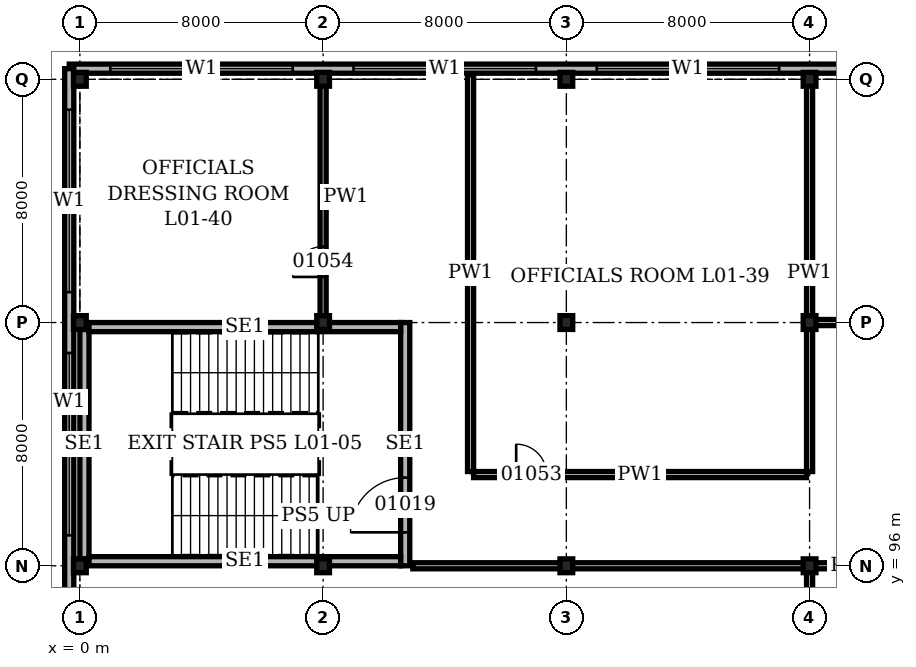
"""IFC4 building model, lengths in metres.
Left out: names, types, materials, properties, quantities, classifications, styles, units other than length and angle.
Written with IfcOpenShell. Run it as: python <this file> out.ifc"""

import sys

from ifc_helpers import new_model, si_unit, direction, frame, frame_2d, origin, origin_2d, place, context, subcontext, project, spatial, rectangle, i_section, extrude, element, fill, save


model = new_model("IFC4")
c1 = context("Model", 3, precision=1e-05, world=origin(), true_north=direction((0.0, 1.0)))
c2 = subcontext(c1, "Body", "Model", "MODEL_VIEW")
j1 = project(units=[si_unit("LENGTHUNIT", "METRE"), si_unit("PLANEANGLEUNIT", "RADIAN")], contexts=[c1])
p1 = place(None, origin())
s1 = spatial("IfcSite", under=j1, at=p1, CompositionType="ELEMENT")
p2 = place(p1, origin())
s2 = spatial("IfcBuilding", under=s1, at=p2, CompositionType="ELEMENT")
p3 = place(p2, frame((0.0, 0.0, 4.9)))
s3 = spatial("IfcBuildingStorey", under=s2, at=p3, CompositionType="ELEMENT", Elevation=4.9)
for number, where, z_axis, x_axis in (
    (1, (0.0, 96.0, 0.0), (0.0, 0.0, 1.0), (1.0, 0.0, 0.0)),
    (2, (0.0, 104.0, 0.0), (0.0, 0.0, 1.0), (1.0, 0.0, 0.0)),
    (3, (0.0, 112.0, 0.0), (0.0, 0.0, 1.0), (1.0, 0.0, 0.0)),
    (4, (8.0, 96.0, 0.0), (0.0, 0.0, 1.0), (1.0, 0.0, 0.0)),
    (5, (8.0, 104.0, 0.0), (0.0, 0.0, 1.0), (1.0, 0.0, 0.0)),
    (6, (8.0, 112.0, 0.0), (0.0, 0.0, 1.0), (1.0, 0.0, 0.0)),
    (7, (16.0, 96.0, 0.0), (0.0, 0.0, 1.0), (1.0, 0.0, 0.0)),
    (8, (16.0, 104.0, 0.0), (0.0, 0.0, 1.0), (1.0, 0.0, 0.0)),
    (9, (16.0, 112.0, 0.0), (0.0, 0.0, 1.0), (1.0, 0.0, 0.0)),
    (10, (24.0, 96.0, 0.0), (0.0, 0.0, 1.0), (1.0, 0.0, 0.0)),
    (11, (24.0, 104.0, 0.0), (0.0, 0.0, 1.0), (1.0, 0.0, 0.0)),
    (12, (24.0, 112.0, 0.0), (0.0, 0.0, 1.0), (1.0, 0.0, 0.0)),
):
    element("IfcColumn", number, at=place(p3, frame(where, z_axis=z_axis, x_axis=x_axis)), inside=s3, PredefinedType="COLUMN", context=c2, shape_type="SweptSolid", body=[
        extrude(i_section(OverallWidth=0.419, OverallDepth=0.455, WebThickness=0.042, FlangeThickness=0.068, at=origin_2d()), origin(), (0.0, 0.0, 1.0), 5.0),
    ])
p4 = place(p3, frame((112.35, 112.35, 0.0), z_axis=(0.0, 0.0, 1.0), x_axis=(-1.0, 0.0, 0.0)))
e13 = element("IfcWall", 13, at=p4, inside=s3, PredefinedType="SOLIDWALL", context=c2, shape_type="SweptSolid", body=[
    extrude(rectangle(XDim=112.7, YDim=0.3, at=frame_2d((56.35, 0.0))), origin(), (0.0, 0.0, 1.0), 5.0),
])
p5 = place(p4, frame((1.35, 0.0, 1.0)))
e14 = element("IfcOpeningElement", 14, at=p5, cuts=e13, PredefinedType="OPENING", context=c2, shape_type="SweptSolid", body=[
    extrude(rectangle(XDim=6.0, YDim=1.5, at=frame_2d((3.0, 0.75))), frame((0.0, 0.16, 0.0), z_axis=(0.0, -1.0, 0.0), x_axis=(1.0, 0.0, 0.0)), (0.0, 0.0, 1.0), 0.32),
])
p6 = place(p4, frame((9.35, 0.0, 1.0)))
e15 = element("IfcOpeningElement", 15, at=p6, cuts=e13, PredefinedType="OPENING", context=c2, shape_type="SweptSolid", body=[
    extrude(rectangle(XDim=6.0, YDim=1.5, at=frame_2d((3.0, 0.75))), frame((0.0, 0.16, 0.0), z_axis=(0.0, -1.0, 0.0), x_axis=(1.0, 0.0, 0.0)), (0.0, 0.0, 1.0), 0.32),
])
p7 = place(p4, frame((17.35, 0.0, 1.0)))
e16 = element("IfcOpeningElement", 16, at=p7, cuts=e13, PredefinedType="OPENING", context=c2, shape_type="SweptSolid", body=[
    extrude(rectangle(XDim=6.0, YDim=1.5, at=frame_2d((3.0, 0.75))), frame((0.0, 0.16, 0.0), z_axis=(0.0, -1.0, 0.0), x_axis=(1.0, 0.0, 0.0)), (0.0, 0.0, 1.0), 0.32),
])
p8 = place(p4, frame((25.35, 0.0, 1.0)))
e17 = element("IfcOpeningElement", 17, at=p8, cuts=e13, PredefinedType="OPENING", context=c2, shape_type="SweptSolid", body=[
    extrude(rectangle(XDim=6.0, YDim=1.5, at=frame_2d((3.0, 0.75))), frame((0.0, 0.16, 0.0), z_axis=(0.0, -1.0, 0.0), x_axis=(1.0, 0.0, 0.0)), (0.0, 0.0, 1.0), 0.32),
])
p9 = place(p4, frame((33.35, 0.0, 1.0)))
e18 = element("IfcOpeningElement", 18, at=p9, cuts=e13, PredefinedType="OPENING", context=c2, shape_type="SweptSolid", body=[
    extrude(rectangle(XDim=6.0, YDim=1.5, at=frame_2d((3.0, 0.75))), frame((0.0, 0.16, 0.0), z_axis=(0.0, -1.0, 0.0), x_axis=(1.0, 0.0, 0.0)), (0.0, 0.0, 1.0), 0.32),
])
p10 = place(p4, frame((41.35, 0.0, 1.0)))
e19 = element("IfcOpeningElement", 19, at=p10, cuts=e13, PredefinedType="OPENING", context=c2, shape_type="SweptSolid", body=[
    extrude(rectangle(XDim=6.0, YDim=1.5, at=frame_2d((3.0, 0.75))), frame((0.0, 0.16, 0.0), z_axis=(0.0, -1.0, 0.0), x_axis=(1.0, 0.0, 0.0)), (0.0, 0.0, 1.0), 0.32),
])
p11 = place(p4, frame((49.35, 0.0, 1.0)))
e20 = element("IfcOpeningElement", 20, at=p11, cuts=e13, PredefinedType="OPENING", context=c2, shape_type="SweptSolid", body=[
    extrude(rectangle(XDim=6.0, YDim=1.5, at=frame_2d((3.0, 0.75))), frame((0.0, 0.16, 0.0), z_axis=(0.0, -1.0, 0.0), x_axis=(1.0, 0.0, 0.0)), (0.0, 0.0, 1.0), 0.32),
])
p12 = place(p4, frame((57.35, 0.0, 1.0)))
e21 = element("IfcOpeningElement", 21, at=p12, cuts=e13, PredefinedType="OPENING", context=c2, shape_type="SweptSolid", body=[
    extrude(rectangle(XDim=6.0, YDim=1.5, at=frame_2d((3.0, 0.75))), frame((0.0, 0.16, 0.0), z_axis=(0.0, -1.0, 0.0), x_axis=(1.0, 0.0, 0.0)), (0.0, 0.0, 1.0), 0.32),
])
p13 = place(p4, frame((65.35, 0.0, 1.0)))
e22 = element("IfcOpeningElement", 22, at=p13, cuts=e13, PredefinedType="OPENING", context=c2, shape_type="SweptSolid", body=[
    extrude(rectangle(XDim=6.0, YDim=1.5, at=frame_2d((3.0, 0.75))), frame((0.0, 0.16, 0.0), z_axis=(0.0, -1.0, 0.0), x_axis=(1.0, 0.0, 0.0)), (0.0, 0.0, 1.0), 0.32),
])
p14 = place(p4, frame((73.35, 0.0, 1.0)))
e23 = element("IfcOpeningElement", 23, at=p14, cuts=e13, PredefinedType="OPENING", context=c2, shape_type="SweptSolid", body=[
    extrude(rectangle(XDim=6.0, YDim=1.5, at=frame_2d((3.0, 0.75))), frame((0.0, 0.16, 0.0), z_axis=(0.0, -1.0, 0.0), x_axis=(1.0, 0.0, 0.0)), (0.0, 0.0, 1.0), 0.32),
])
p15 = place(p4, frame((81.35, 0.0, 1.0)))
e24 = element("IfcOpeningElement", 24, at=p15, cuts=e13, PredefinedType="OPENING", context=c2, shape_type="SweptSolid", body=[
    extrude(rectangle(XDim=6.0, YDim=1.5, at=frame_2d((3.0, 0.75))), frame((0.0, 0.16, 0.0), z_axis=(0.0, -1.0, 0.0), x_axis=(1.0, 0.0, 0.0)), (0.0, 0.0, 1.0), 0.32),
])
p16 = place(p4, frame((89.35, 0.0, 1.0)))
e25 = element("IfcOpeningElement", 25, at=p16, cuts=e13, PredefinedType="OPENING", context=c2, shape_type="SweptSolid", body=[
    extrude(rectangle(XDim=6.0, YDim=1.5, at=frame_2d((3.0, 0.75))), frame((0.0, 0.16, 0.0), z_axis=(0.0, -1.0, 0.0), x_axis=(1.0, 0.0, 0.0)), (0.0, 0.0, 1.0), 0.32),
])
p17 = place(p4, frame((97.35, 0.0, 1.0)))
e26 = element("IfcOpeningElement", 26, at=p17, cuts=e13, PredefinedType="OPENING", context=c2, shape_type="SweptSolid", body=[
    extrude(rectangle(XDim=6.0, YDim=1.5, at=frame_2d((3.0, 0.75))), frame((0.0, 0.16, 0.0), z_axis=(0.0, -1.0, 0.0), x_axis=(1.0, 0.0, 0.0)), (0.0, 0.0, 1.0), 0.32),
])
p18 = place(p4, frame((105.35, 0.0, 1.0)))
e27 = element("IfcOpeningElement", 27, at=p18, cuts=e13, PredefinedType="OPENING", context=c2, shape_type="SweptSolid", body=[
    extrude(rectangle(XDim=6.0, YDim=1.5, at=frame_2d((3.0, 0.75))), frame((0.0, 0.16, 0.0), z_axis=(0.0, -1.0, 0.0), x_axis=(1.0, 0.0, 0.0)), (0.0, 0.0, 1.0), 0.32),
])
p19 = place(p3, frame((-0.35, 112.35, 0.0), z_axis=(0.0, 0.0, 1.0), x_axis=(0.0, -1.0, 0.0)))
e28 = element("IfcWall", 28, at=p19, inside=s3, PredefinedType="SOLIDWALL", context=c2, shape_type="SweptSolid", body=[
    extrude(rectangle(XDim=112.7, YDim=0.3, at=frame_2d((56.35, 0.0))), origin(), (0.0, 0.0, 1.0), 5.0),
])
p20 = place(p19, frame((1.35, 0.0, 1.0)))
e29 = element("IfcOpeningElement", 29, at=p20, cuts=e28, PredefinedType="OPENING", context=c2, shape_type="SweptSolid", body=[
    extrude(rectangle(XDim=6.0, YDim=1.5, at=frame_2d((3.0, 0.75))), frame((0.0, 0.16, 0.0), z_axis=(0.0, -1.0, 0.0), x_axis=(1.0, 0.0, 0.0)), (0.0, 0.0, 1.0), 0.32),
])
p21 = place(p19, frame((9.35, 0.0, 1.0)))
e30 = element("IfcOpeningElement", 30, at=p21, cuts=e28, PredefinedType="OPENING", context=c2, shape_type="SweptSolid", body=[
    extrude(rectangle(XDim=6.0, YDim=1.5, at=frame_2d((3.0, 0.75))), frame((0.0, 0.16, 0.0), z_axis=(0.0, -1.0, 0.0), x_axis=(1.0, 0.0, 0.0)), (0.0, 0.0, 1.0), 0.32),
])
p22 = place(p19, frame((17.35, 0.0, 1.0)))
e31 = element("IfcOpeningElement", 31, at=p22, cuts=e28, PredefinedType="OPENING", context=c2, shape_type="SweptSolid", body=[
    extrude(rectangle(XDim=6.0, YDim=1.5, at=frame_2d((3.0, 0.75))), frame((0.0, 0.16, 0.0), z_axis=(0.0, -1.0, 0.0), x_axis=(1.0, 0.0, 0.0)), (0.0, 0.0, 1.0), 0.32),
])
p23 = place(p19, frame((25.35, 0.0, 1.0)))
e32 = element("IfcOpeningElement", 32, at=p23, cuts=e28, PredefinedType="OPENING", context=c2, shape_type="SweptSolid", body=[
    extrude(rectangle(XDim=6.0, YDim=1.5, at=frame_2d((3.0, 0.75))), frame((0.0, 0.16, 0.0), z_axis=(0.0, -1.0, 0.0), x_axis=(1.0, 0.0, 0.0)), (0.0, 0.0, 1.0), 0.32),
])
p24 = place(p19, frame((33.35, 0.0, 1.0)))
e33 = element("IfcOpeningElement", 33, at=p24, cuts=e28, PredefinedType="OPENING", context=c2, shape_type="SweptSolid", body=[
    extrude(rectangle(XDim=6.0, YDim=1.5, at=frame_2d((3.0, 0.75))), frame((0.0, 0.16, 0.0), z_axis=(0.0, -1.0, 0.0), x_axis=(1.0, 0.0, 0.0)), (0.0, 0.0, 1.0), 0.32),
])
p25 = place(p19, frame((41.35, 0.0, 1.0)))
e34 = element("IfcOpeningElement", 34, at=p25, cuts=e28, PredefinedType="OPENING", context=c2, shape_type="SweptSolid", body=[
    extrude(rectangle(XDim=6.0, YDim=1.5, at=frame_2d((3.0, 0.75))), frame((0.0, 0.16, 0.0), z_axis=(0.0, -1.0, 0.0), x_axis=(1.0, 0.0, 0.0)), (0.0, 0.0, 1.0), 0.32),
])
p26 = place(p19, frame((49.35, 0.0, 1.0)))
e35 = element("IfcOpeningElement", 35, at=p26, cuts=e28, PredefinedType="OPENING", context=c2, shape_type="SweptSolid", body=[
    extrude(rectangle(XDim=6.0, YDim=1.5, at=frame_2d((3.0, 0.75))), frame((0.0, 0.16, 0.0), z_axis=(0.0, -1.0, 0.0), x_axis=(1.0, 0.0, 0.0)), (0.0, 0.0, 1.0), 0.32),
])
p27 = place(p19, frame((57.35, 0.0, 1.0)))
e36 = element("IfcOpeningElement", 36, at=p27, cuts=e28, PredefinedType="OPENING", context=c2, shape_type="SweptSolid", body=[
    extrude(rectangle(XDim=6.0, YDim=1.5, at=frame_2d((3.0, 0.75))), frame((0.0, 0.16, 0.0), z_axis=(0.0, -1.0, 0.0), x_axis=(1.0, 0.0, 0.0)), (0.0, 0.0, 1.0), 0.32),
])
p28 = place(p19, frame((65.35, 0.0, 1.0)))
e37 = element("IfcOpeningElement", 37, at=p28, cuts=e28, PredefinedType="OPENING", context=c2, shape_type="SweptSolid", body=[
    extrude(rectangle(XDim=6.0, YDim=1.5, at=frame_2d((3.0, 0.75))), frame((0.0, 0.16, 0.0), z_axis=(0.0, -1.0, 0.0), x_axis=(1.0, 0.0, 0.0)), (0.0, 0.0, 1.0), 0.32),
])
p29 = place(p19, frame((73.35, 0.0, 1.0)))
e38 = element("IfcOpeningElement", 38, at=p29, cuts=e28, PredefinedType="OPENING", context=c2, shape_type="SweptSolid", body=[
    extrude(rectangle(XDim=6.0, YDim=1.5, at=frame_2d((3.0, 0.75))), frame((0.0, 0.16, 0.0), z_axis=(0.0, -1.0, 0.0), x_axis=(1.0, 0.0, 0.0)), (0.0, 0.0, 1.0), 0.32),
])
p30 = place(p19, frame((81.35, 0.0, 1.0)))
e39 = element("IfcOpeningElement", 39, at=p30, cuts=e28, PredefinedType="OPENING", context=c2, shape_type="SweptSolid", body=[
    extrude(rectangle(XDim=6.0, YDim=1.5, at=frame_2d((3.0, 0.75))), frame((0.0, 0.16, 0.0), z_axis=(0.0, -1.0, 0.0), x_axis=(1.0, 0.0, 0.0)), (0.0, 0.0, 1.0), 0.32),
])
p31 = place(p19, frame((89.35, 0.0, 1.0)))
e40 = element("IfcOpeningElement", 40, at=p31, cuts=e28, PredefinedType="OPENING", context=c2, shape_type="SweptSolid", body=[
    extrude(rectangle(XDim=6.0, YDim=1.5, at=frame_2d((3.0, 0.75))), frame((0.0, 0.16, 0.0), z_axis=(0.0, -1.0, 0.0), x_axis=(1.0, 0.0, 0.0)), (0.0, 0.0, 1.0), 0.32),
])
p32 = place(p19, frame((97.35, 0.0, 1.0)))
e41 = element("IfcOpeningElement", 41, at=p32, cuts=e28, PredefinedType="OPENING", context=c2, shape_type="SweptSolid", body=[
    extrude(rectangle(XDim=6.0, YDim=1.5, at=frame_2d((3.0, 0.75))), frame((0.0, 0.16, 0.0), z_axis=(0.0, -1.0, 0.0), x_axis=(1.0, 0.0, 0.0)), (0.0, 0.0, 1.0), 0.32),
])
p33 = place(p19, frame((105.35, 0.0, 1.0)))
e42 = element("IfcOpeningElement", 42, at=p33, cuts=e28, PredefinedType="OPENING", context=c2, shape_type="SweptSolid", body=[
    extrude(rectangle(XDim=6.0, YDim=1.5, at=frame_2d((3.0, 0.75))), frame((0.0, 0.16, 0.0), z_axis=(0.0, -1.0, 0.0), x_axis=(1.0, 0.0, 0.0)), (0.0, 0.0, 1.0), 0.32),
])
p34 = place(p3, frame((0.15, 96.227, 0.0), z_axis=(0.0, 0.0, 1.0), x_axis=(0.0, 1.0, 0.0)))
e43 = element("IfcWall", 43, at=p34, inside=s3, PredefinedType="SOLIDWALL", context=c2, shape_type="SweptSolid", body=[
    extrude(rectangle(XDim=7.545, YDim=0.3, at=frame_2d((3.773, 0.0))), origin(), (0.0, 0.0, 1.0), 4.8),
])
p35 = place(p3, frame((10.7, 96.0, 0.0), z_axis=(0.0, 0.0, 1.0), x_axis=(0.0, 1.0, 0.0)))
e44 = element("IfcWall", 44, at=p35, inside=s3, PredefinedType="SOLIDWALL", context=c2, shape_type="SweptSolid", body=[
    extrude(rectangle(XDim=8.0, YDim=0.3, at=frame_2d((4.0, 0.0))), origin(), (0.0, 0.0, 1.0), 4.8),
])
p36 = place(p35, frame((1.1, 0.0, 0.0)))
e45 = element("IfcOpeningElement", 45, at=p36, cuts=e44, PredefinedType="OPENING", context=c2, shape_type="SweptSolid", body=[
    extrude(rectangle(XDim=1.8, YDim=2.1, at=frame_2d((0.9, 1.05))), frame((0.0, 0.16, 0.0), z_axis=(0.0, -1.0, 0.0), x_axis=(1.0, 0.0, 0.0)), (0.0, 0.0, 1.0), 0.32),
])
for number, where, z_axis, x_axis in (
    (46, (0.3, 96.15, 0.0), (0.0, 0.0, 1.0), (1.0, 0.0, 0.0)),
    (47, (0.3, 103.85, 0.0), (0.0, 0.0, 1.0), (1.0, 0.0, 0.0)),
):
    element("IfcWall", number, at=place(p3, frame(where, z_axis=z_axis, x_axis=x_axis)), inside=s3, PredefinedType="SOLIDWALL", context=c2, shape_type="SweptSolid", body=[
        extrude(rectangle(XDim=10.25, YDim=0.3, at=frame_2d((5.125, 0.0))), origin(), (0.0, 0.0, 1.0), 4.8),
    ])
p37 = place(p3, frame((10.95, 96.0, 0.0), z_axis=(0.0, 0.0, 1.0), x_axis=(1.0, 0.0, 0.0)))
e48 = element("IfcWall", 48, at=p37, inside=s3, PredefinedType="PARTITIONING", context=c2, shape_type="SweptSolid", body=[
    extrude(rectangle(XDim=28.95, YDim=0.2, at=frame_2d((14.475, 0.0))), origin(), (0.0, 0.0, 1.0), 4.028),
])
p38 = place(p3, frame((12.95, 99.0, 0.0), z_axis=(0.0, 0.0, 1.0), x_axis=(1.0, 0.0, 0.0)))
e49 = element("IfcWall", 49, at=p38, inside=s3, PredefinedType="PARTITIONING", context=c2, shape_type="SweptSolid", body=[
    extrude(rectangle(XDim=10.95, YDim=0.2, at=frame_2d((5.475, 0.0))), origin(), (0.0, 0.0, 1.0), 4.8),
])
p39 = place(p38, frame((1.4, 0.0, 0.0)))
e50 = element("IfcOpeningElement", 50, at=p39, cuts=e49, PredefinedType="OPENING", context=c2, shape_type="SweptSolid", body=[
    extrude(rectangle(XDim=1.0, YDim=2.1, at=frame_2d((0.5, 1.05))), frame((0.0, 0.11, 0.0), z_axis=(0.0, -1.0, 0.0), x_axis=(1.0, 0.0, 0.0)), (0.0, 0.0, 1.0), 0.22),
])
p40 = place(p3, frame((24.1, 104.0, 0.0), z_axis=(0.0, 0.0, 1.0), x_axis=(1.0, 0.0, 0.0)))
e51 = element("IfcWall", 51, at=p40, inside=s3, PredefinedType="PARTITIONING", context=c2, shape_type="SweptSolid", body=[
    extrude(rectangle(XDim=79.8, YDim=0.2, at=frame_2d((39.9, 0.0))), origin(), (0.0, 0.0, 1.0), 4.028),
])
p41 = place(p40, frame((1.0, 0.0, 0.0)))
e52 = element("IfcOpeningElement", 52, at=p41, cuts=e51, PredefinedType="OPENING", context=c2, shape_type="SweptSolid", body=[
    extrude(rectangle(XDim=1.8, YDim=2.4, at=frame_2d((0.9, 1.2))), frame((0.0, 0.11, 0.0), z_axis=(0.0, -1.0, 0.0), x_axis=(1.0, 0.0, 0.0)), (0.0, 0.0, 1.0), 0.22),
])
p42 = place(p40, frame((20.65, 0.0, 0.0)))
e53 = element("IfcOpeningElement", 53, at=p42, cuts=e51, PredefinedType="OPENING", context=c2, shape_type="SweptSolid", body=[
    extrude(rectangle(XDim=1.0, YDim=2.1, at=frame_2d((0.5, 1.05))), frame((0.0, 0.11, 0.0), z_axis=(0.0, -1.0, 0.0), x_axis=(1.0, 0.0, 0.0)), (0.0, 0.0, 1.0), 0.22),
])
p43 = place(p40, frame((34.15, 0.0, 0.0)))
e54 = element("IfcOpeningElement", 54, at=p43, cuts=e51, PredefinedType="OPENING", context=c2, shape_type="SweptSolid", body=[
    extrude(rectangle(XDim=1.0, YDim=2.1, at=frame_2d((0.5, 1.05))), frame((0.0, 0.11, 0.0), z_axis=(0.0, -1.0, 0.0), x_axis=(1.0, 0.0, 0.0)), (0.0, 0.0, 1.0), 0.22),
])
p44 = place(p40, frame((44.65, 0.0, 0.0)))
e55 = element("IfcOpeningElement", 55, at=p44, cuts=e51, PredefinedType="OPENING", context=c2, shape_type="SweptSolid", body=[
    extrude(rectangle(XDim=1.0, YDim=2.1, at=frame_2d((0.5, 1.05))), frame((0.0, 0.11, 0.0), z_axis=(0.0, -1.0, 0.0), x_axis=(1.0, 0.0, 0.0)), (0.0, 0.0, 1.0), 0.22),
])
p45 = place(p40, frame((65.4, 0.0, 0.0)))
e56 = element("IfcOpeningElement", 56, at=p45, cuts=e51, PredefinedType="OPENING", context=c2, shape_type="SweptSolid", body=[
    extrude(rectangle(XDim=1.0, YDim=2.1, at=frame_2d((0.5, 1.05))), frame((0.0, 0.11, 0.0), z_axis=(0.0, -1.0, 0.0), x_axis=(1.0, 0.0, 0.0)), (0.0, 0.0, 1.0), 0.22),
])
p46 = place(p3, frame((8.0, 104.1, 0.0), z_axis=(0.0, 0.0, 1.0), x_axis=(0.0, 1.0, 0.0)))
e57 = element("IfcWall", 57, at=p46, inside=s3, PredefinedType="PARTITIONING", context=c2, shape_type="SweptSolid", body=[
    extrude(rectangle(XDim=8.05, YDim=0.2, at=frame_2d((4.025, 0.0))), origin(), (0.0, 0.0, 1.0), 4.028),
])
p47 = place(p46, frame((1.4, 0.0, 0.0)))
e58 = element("IfcOpeningElement", 58, at=p47, cuts=e57, PredefinedType="OPENING", context=c2, shape_type="SweptSolid", body=[
    extrude(rectangle(XDim=1.0, YDim=2.1, at=frame_2d((0.5, 1.05))), frame((0.0, 0.11, 0.0), z_axis=(0.0, -1.0, 0.0), x_axis=(1.0, 0.0, 0.0)), (0.0, 0.0, 1.0), 0.22),
])
p48 = place(p3, frame((12.85, 99.1, 0.0), z_axis=(0.0, 0.0, 1.0), x_axis=(0.0, 1.0, 0.0)))
e59 = element("IfcWall", 59, at=p48, inside=s3, PredefinedType="PARTITIONING", context=c2, shape_type="SweptSolid", body=[
    extrude(rectangle(XDim=13.05, YDim=0.2, at=frame_2d((6.525, 0.0))), origin(), (0.0, 0.0, 1.0), 4.8),
])
p49 = place(p3, frame((24.0, 72.1, 0.0), z_axis=(0.0, 0.0, 1.0), x_axis=(0.0, 1.0, 0.0)))
e60 = element("IfcWall", 60, at=p49, inside=s3, PredefinedType="PARTITIONING", context=c2, shape_type="SweptSolid", body=[
    extrude(rectangle(XDim=23.8, YDim=0.2, at=frame_2d((11.9, 0.0))), origin(), (0.0, 0.0, 1.0), 4.028),
])
p50 = place(p3, frame((24.0, 99.1, 0.0), z_axis=(0.0, 0.0, 1.0), x_axis=(0.0, 1.0, 0.0)))
e61 = element("IfcWall", 61, at=p50, inside=s3, PredefinedType="PARTITIONING", context=c2, shape_type="SweptSolid", body=[
    extrude(rectangle(XDim=13.05, YDim=0.2, at=frame_2d((6.525, 0.0))), origin(), (0.0, 0.0, 1.0), 4.028),
])
p51 = place(p16, origin())
e62 = element("IfcWindow", 62, at=p51, inside=s3, PartitioningType="SINGLE_PANEL", PredefinedType="WINDOW", context=c2, shape_type="SweptSolid", body=[
    extrude(rectangle(XDim=6.0, YDim=1.5, at=frame_2d((3.0, 0.75))), frame((0.0, 0.03, 0.0), z_axis=(0.0, -1.0, 0.0), x_axis=(1.0, 0.0, 0.0)), (0.0, 0.0, 1.0), 0.06),
])
fill(e25, e62)
p52 = place(p17, origin())
e63 = element("IfcWindow", 63, at=p52, inside=s3, PartitioningType="SINGLE_PANEL", PredefinedType="WINDOW", context=c2, shape_type="SweptSolid", body=[
    extrude(rectangle(XDim=6.0, YDim=1.5, at=frame_2d((3.0, 0.75))), frame((0.0, 0.03, 0.0), z_axis=(0.0, -1.0, 0.0), x_axis=(1.0, 0.0, 0.0)), (0.0, 0.0, 1.0), 0.06),
])
fill(e26, e63)
p53 = place(p18, origin())
e64 = element("IfcWindow", 64, at=p53, inside=s3, PartitioningType="SINGLE_PANEL", PredefinedType="WINDOW", context=c2, shape_type="SweptSolid", body=[
    extrude(rectangle(XDim=6.0, YDim=1.5, at=frame_2d((3.0, 0.75))), frame((0.0, 0.03, 0.0), z_axis=(0.0, -1.0, 0.0), x_axis=(1.0, 0.0, 0.0)), (0.0, 0.0, 1.0), 0.06),
])
fill(e27, e64)
p54 = place(p20, origin())
e65 = element("IfcWindow", 65, at=p54, inside=s3, PartitioningType="SINGLE_PANEL", PredefinedType="WINDOW", context=c2, shape_type="SweptSolid", body=[
    extrude(rectangle(XDim=6.0, YDim=1.5, at=frame_2d((3.0, 0.75))), frame((0.0, 0.03, 0.0), z_axis=(0.0, -1.0, 0.0), x_axis=(1.0, 0.0, 0.0)), (0.0, 0.0, 1.0), 0.06),
])
fill(e29, e65)
p55 = place(p21, origin())
e66 = element("IfcWindow", 66, at=p55, inside=s3, PartitioningType="SINGLE_PANEL", PredefinedType="WINDOW", context=c2, shape_type="SweptSolid", body=[
    extrude(rectangle(XDim=6.0, YDim=1.5, at=frame_2d((3.0, 0.75))), frame((0.0, 0.03, 0.0), z_axis=(0.0, -1.0, 0.0), x_axis=(1.0, 0.0, 0.0)), (0.0, 0.0, 1.0), 0.06),
])
fill(e30, e66)
p56 = place(p36, origin())
e67 = element("IfcDoor", 67, at=p56, inside=s3, OperationType="DOUBLE_DOOR_SINGLE_SWING", PredefinedType="DOOR", context=c2, shape_type="SweptSolid", body=[
    extrude(rectangle(XDim=1.8, YDim=2.1, at=frame_2d((0.9, 1.05))), frame((0.0, 0.15, 0.0), z_axis=(0.0, -1.0, 0.0), x_axis=(1.0, 0.0, 0.0)), (0.0, 0.0, 1.0), 0.3),
])
fill(e45, e67)
p57 = place(p39, origin())
e68 = element("IfcDoor", 68, at=p57, inside=s3, OperationType="SINGLE_SWING_LEFT", PredefinedType="DOOR", context=c2, shape_type="SweptSolid", body=[
    extrude(rectangle(XDim=1.0, YDim=2.1, at=frame_2d((0.5, 1.05))), frame((0.0, 0.1, 0.0), z_axis=(0.0, -1.0, 0.0), x_axis=(1.0, 0.0, 0.0)), (0.0, 0.0, 1.0), 0.199),
])
fill(e50, e68)
p58 = place(p47, origin())
e69 = element("IfcDoor", 69, at=p58, inside=s3, OperationType="SINGLE_SWING_LEFT", PredefinedType="DOOR", context=c2, shape_type="SweptSolid", body=[
    extrude(rectangle(XDim=1.0, YDim=2.1, at=frame_2d((0.5, 1.05))), frame((0.0, 0.1, 0.0), z_axis=(0.0, -1.0, 0.0), x_axis=(1.0, 0.0, 0.0)), (0.0, 0.0, 1.0), 0.199),
])
fill(e58, e69)
save(model, sys.argv[1])
